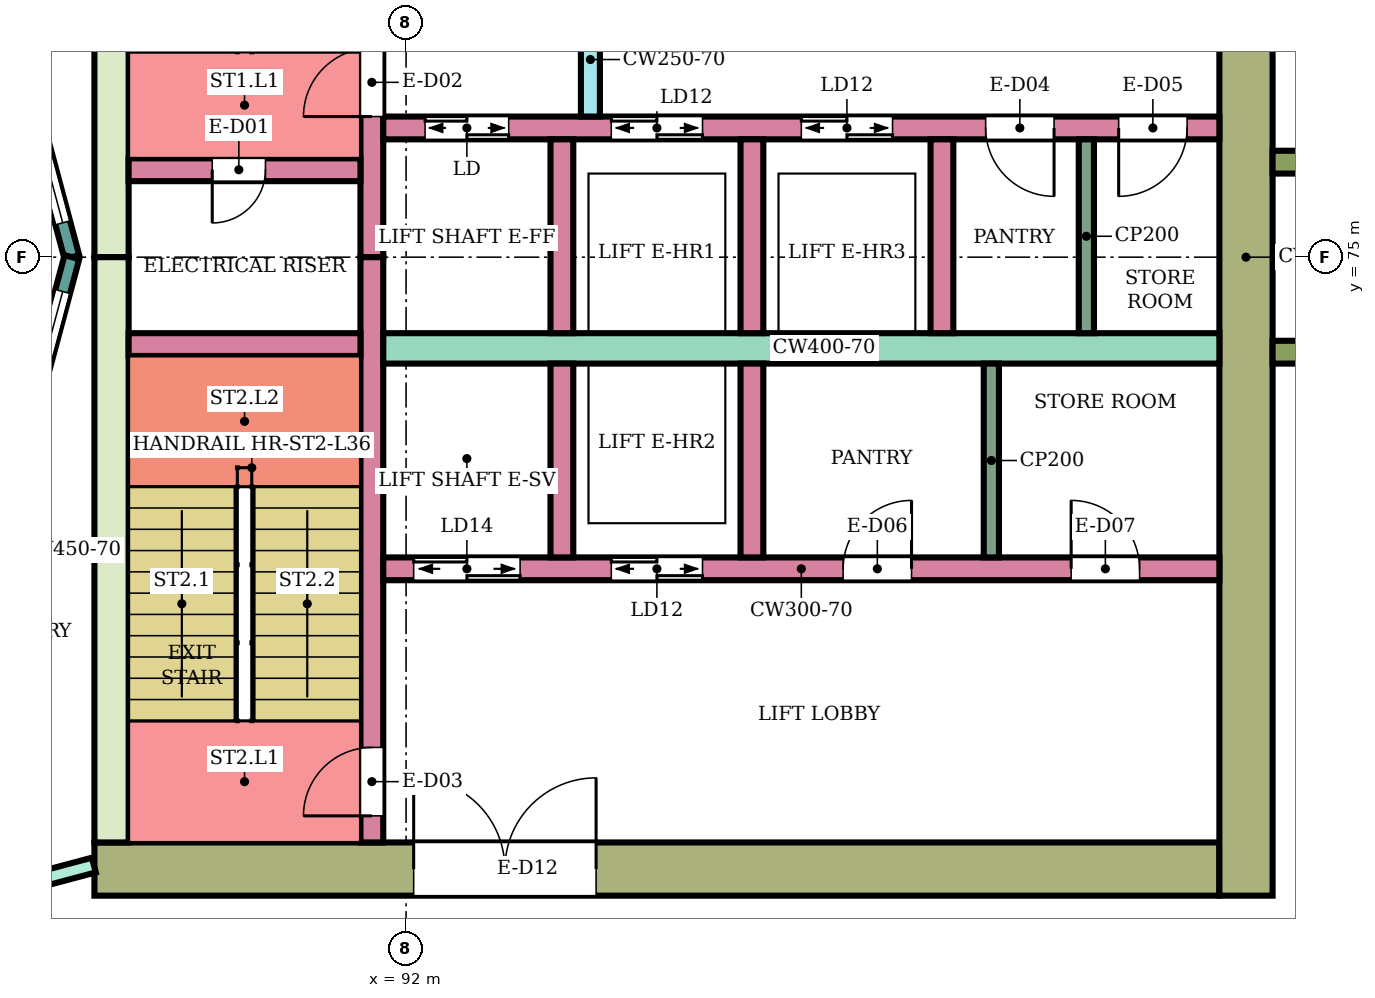
"""IFC4 building model, lengths in metres.
Left out: names, types, materials, properties, quantities, classifications, styles, units other than length and angle.
Written with IfcOpenShell. Run it as: python <this file> out.ifc"""

import sys

from ifc_helpers import new_model, si_unit, direction, frame, frame_2d, origin, place, context, subcontext, project, spatial, rectangle, extrude, element, fill, save


model = new_model("IFC4")
c1 = context("Model", 3, precision=1e-05, world=origin(), true_north=direction((0.0, 1.0)))
c2 = subcontext(c1, "Body", "Model", "MODEL_VIEW")
j1 = project(units=[si_unit("LENGTHUNIT", "METRE"), si_unit("PLANEANGLEUNIT", "RADIAN")], contexts=[c1])
p1 = place(None, origin())
s1 = spatial("IfcSite", under=j1, at=p1, CompositionType="ELEMENT")
p2 = place(p1, origin())
s2 = spatial("IfcBuilding", under=s1, at=p2, CompositionType="ELEMENT")
p3 = place(p2, frame((0.0, 0.0, 157.7)))
s3 = spatial("IfcBuildingStorey", under=s2, at=p3, CompositionType="ELEMENT", Elevation=157.7)
p4 = place(p3, frame((87.9, 66.95, 0.0), z_axis=(0.0, 0.0, 1.0), x_axis=(1.0, 0.0, 0.0)))
e1 = element("IfcWall", 1, at=p4, inside=s3, PredefinedType="SHEAR", context=c2, shape_type="SweptSolid", body=[
    extrude(rectangle(XDim=14.8, YDim=0.7, at=frame_2d((7.4, 0.0))), origin(), (0.0, 0.0, 1.0), 3.78),
])
p5 = place(p4, frame((4.2, 0.0, 0.0)))
e2 = element("IfcOpeningElement", 2, at=p5, cuts=e1, PredefinedType="OPENING", context=c2, shape_type="SweptSolid", body=[
    extrude(rectangle(XDim=2.4, YDim=2.4, at=frame_2d((1.2, 1.2))), frame((0.0, 0.36, 0.0), z_axis=(0.0, -1.0, 0.0), x_axis=(1.0, 0.0, 0.0)), (0.0, 0.0, 1.0), 0.72),
])
for number, where, z_axis, x_axis in (
    (3, (88.125, 75.0, 0.0), (0.0, 0.0, 1.0), (0.0, 1.0, 0.0)),
    (4, (88.125, 67.3, 0.0), (0.0, 0.0, 1.0), (0.0, 1.0, 0.0)),
):
    element("IfcWall", number, at=place(p3, frame(where, z_axis=z_axis, x_axis=x_axis)), inside=s3, PredefinedType="SHEAR", context=c2, shape_type="SweptSolid", body=[
        extrude(rectangle(XDim=7.7, YDim=0.45, at=frame_2d((3.85, 0.0))), origin(), (0.0, 0.0, 1.0), 3.78),
    ])
p6 = place(p3, frame((103.05, 66.6, 0.0), z_axis=(0.0, 0.0, 1.0), x_axis=(0.0, 1.0, 0.0)))
e5 = element("IfcWall", 5, at=p6, inside=s3, PredefinedType="SHEAR", context=c2, shape_type="SweptSolid", body=[
    extrude(rectangle(XDim=16.8, YDim=0.7, at=frame_2d((8.4, 0.0))), origin(), (0.0, 0.0, 1.0), 3.78),
])
p7 = place(p3, frame((91.55, 75.0, 0.0), z_axis=(0.0, 0.0, 1.0), x_axis=(0.0, 1.0, 0.0)))
e6 = element("IfcWall", 6, at=p7, inside=s3, PredefinedType="SHEAR", context=c2, shape_type="SweptSolid", body=[
    extrude(rectangle(XDim=7.7, YDim=0.3, at=frame_2d((3.85, 0.0))), origin(), (0.0, 0.0, 1.0), 3.78),
])
p8 = place(p7, frame((1.85, 0.0, 0.0)))
e7 = element("IfcOpeningElement", 7, at=p8, cuts=e6, PredefinedType="OPENING", context=c2, shape_type="SweptSolid", body=[
    extrude(rectangle(XDim=0.9, YDim=2.1, at=frame_2d((0.45, 1.05))), frame((0.0, 0.16, 0.0), z_axis=(0.0, -1.0, 0.0), x_axis=(1.0, 0.0, 0.0)), (0.0, 0.0, 1.0), 0.32),
])
p9 = place(p3, frame((91.55, 67.3, 0.0), z_axis=(0.0, 0.0, 1.0), x_axis=(0.0, 1.0, 0.0)))
e8 = element("IfcWall", 8, at=p9, inside=s3, PredefinedType="SHEAR", context=c2, shape_type="SweptSolid", body=[
    extrude(rectangle(XDim=7.7, YDim=0.3, at=frame_2d((3.85, 0.0))), origin(), (0.0, 0.0, 1.0), 3.78),
])
p10 = place(p9, frame((0.35, 0.0, 0.0)))
e9 = element("IfcOpeningElement", 9, at=p10, cuts=e8, PredefinedType="OPENING", context=c2, shape_type="SweptSolid", body=[
    extrude(rectangle(XDim=0.9, YDim=2.1, at=frame_2d((0.45, 1.05))), frame((0.0, 0.16, 0.0), z_axis=(0.0, -1.0, 0.0), x_axis=(1.0, 0.0, 0.0)), (0.0, 0.0, 1.0), 0.32),
])
p11 = place(p3, frame((88.35, 76.15, 0.0), z_axis=(0.0, 0.0, 1.0), x_axis=(1.0, 0.0, 0.0)))
e10 = element("IfcWall", 10, at=p11, inside=s3, PredefinedType="SHEAR", context=c2, shape_type="SweptSolid", body=[
    extrude(rectangle(XDim=3.05, YDim=0.3, at=frame_2d((1.525, 0.0))), origin(), (0.0, 0.0, 1.0), 3.78),
])
p12 = place(p11, frame((1.1, 0.0, 0.0)))
e11 = element("IfcOpeningElement", 11, at=p12, cuts=e10, PredefinedType="OPENING", context=c2, shape_type="SweptSolid", body=[
    extrude(rectangle(XDim=0.7, YDim=2.0, at=frame_2d((0.35, 1.0))), frame((0.0, 0.16, 0.0), z_axis=(0.0, -1.0, 0.0), x_axis=(1.0, 0.0, 0.0)), (0.0, 0.0, 1.0), 0.32),
])
p13 = place(p3, frame((88.35, 73.85, 0.0), z_axis=(0.0, 0.0, 1.0), x_axis=(1.0, 0.0, 0.0)))
e12 = element("IfcWall", 12, at=p13, inside=s3, PredefinedType="SHEAR", context=c2, shape_type="SweptSolid", body=[
    extrude(rectangle(XDim=3.05, YDim=0.3, at=frame_2d((1.525, 0.0))), origin(), (0.0, 0.0, 1.0), 3.78),
])
p14 = place(p3, frame((91.7, 76.7, 0.0), z_axis=(0.0, 0.0, 1.0), x_axis=(1.0, 0.0, 0.0)))
e13 = element("IfcWall", 13, at=p14, inside=s3, PredefinedType="SHEAR", context=c2, shape_type="SweptSolid", body=[
    extrude(rectangle(XDim=11.0, YDim=0.3, at=frame_2d((5.5, 0.0))), origin(), (0.0, 0.0, 1.0), 3.78),
])
p15 = place(p14, frame((0.55, 0.0, 0.0)))
e14 = element("IfcOpeningElement", 14, at=p15, cuts=e13, PredefinedType="OPENING", context=c2, shape_type="SweptSolid", body=[
    extrude(rectangle(XDim=1.1, YDim=2.1, at=frame_2d((0.55, 1.05))), frame((0.0, 0.16, 0.0), z_axis=(0.0, -1.0, 0.0), x_axis=(1.0, 0.0, 0.0)), (0.0, 0.0, 1.0), 0.32),
])
p16 = place(p14, frame((3.0, 0.0, 0.0)))
e15 = element("IfcOpeningElement", 15, at=p16, cuts=e13, PredefinedType="OPENING", context=c2, shape_type="SweptSolid", body=[
    extrude(rectangle(XDim=1.2, YDim=2.1, at=frame_2d((0.6, 1.05))), frame((0.0, 0.16, 0.0), z_axis=(0.0, -1.0, 0.0), x_axis=(1.0, 0.0, 0.0)), (0.0, 0.0, 1.0), 0.32),
])
p17 = place(p14, frame((5.5, 0.0, 0.0)))
e16 = element("IfcOpeningElement", 16, at=p17, cuts=e13, PredefinedType="OPENING", context=c2, shape_type="SweptSolid", body=[
    extrude(rectangle(XDim=1.2, YDim=2.1, at=frame_2d((0.6, 1.05))), frame((0.0, 0.16, 0.0), z_axis=(0.0, -1.0, 0.0), x_axis=(1.0, 0.0, 0.0)), (0.0, 0.0, 1.0), 0.32),
])
p18 = place(p14, frame((7.925, 0.0, 0.0)))
e17 = element("IfcOpeningElement", 17, at=p18, cuts=e13, PredefinedType="OPENING", context=c2, shape_type="SweptSolid", body=[
    extrude(rectangle(XDim=0.9, YDim=2.1, at=frame_2d((0.45, 1.05))), frame((0.0, 0.16, 0.0), z_axis=(0.0, -1.0, 0.0), x_axis=(1.0, 0.0, 0.0)), (0.0, 0.0, 1.0), 0.32),
])
p19 = place(p14, frame((9.675, 0.0, 0.0)))
e18 = element("IfcOpeningElement", 18, at=p19, cuts=e13, PredefinedType="OPENING", context=c2, shape_type="SweptSolid", body=[
    extrude(rectangle(XDim=0.9, YDim=2.1, at=frame_2d((0.45, 1.05))), frame((0.0, 0.16, 0.0), z_axis=(0.0, -1.0, 0.0), x_axis=(1.0, 0.0, 0.0)), (0.0, 0.0, 1.0), 0.32),
])
p20 = place(p3, frame((91.7, 73.8, 0.0), z_axis=(0.0, 0.0, 1.0), x_axis=(1.0, 0.0, 0.0)))
e19 = element("IfcWall", 19, at=p20, inside=s3, PredefinedType="SHEAR", context=c2, shape_type="SweptSolid", body=[
    extrude(rectangle(XDim=11.0, YDim=0.4, at=frame_2d((5.5, 0.0))), origin(), (0.0, 0.0, 1.0), 3.78),
])
p21 = place(p3, frame((91.7, 70.9, 0.0), z_axis=(0.0, 0.0, 1.0), x_axis=(1.0, 0.0, 0.0)))
e20 = element("IfcWall", 20, at=p21, inside=s3, PredefinedType="SHEAR", context=c2, shape_type="SweptSolid", body=[
    extrude(rectangle(XDim=11.0, YDim=0.3, at=frame_2d((5.5, 0.0))), origin(), (0.0, 0.0, 1.0), 3.78),
])
p22 = place(p21, frame((0.4, 0.0, 0.0)))
e21 = element("IfcOpeningElement", 21, at=p22, cuts=e20, PredefinedType="OPENING", context=c2, shape_type="SweptSolid", body=[
    extrude(rectangle(XDim=1.4, YDim=2.1, at=frame_2d((0.7, 1.05))), frame((0.0, 0.16, 0.0), z_axis=(0.0, -1.0, 0.0), x_axis=(1.0, 0.0, 0.0)), (0.0, 0.0, 1.0), 0.32),
])
p23 = place(p21, frame((3.0, 0.0, 0.0)))
e22 = element("IfcOpeningElement", 22, at=p23, cuts=e20, PredefinedType="OPENING", context=c2, shape_type="SweptSolid", body=[
    extrude(rectangle(XDim=1.2, YDim=2.1, at=frame_2d((0.6, 1.05))), frame((0.0, 0.16, 0.0), z_axis=(0.0, -1.0, 0.0), x_axis=(1.0, 0.0, 0.0)), (0.0, 0.0, 1.0), 0.32),
])
p24 = place(p21, frame((6.05, 0.0, 0.0)))
e23 = element("IfcOpeningElement", 23, at=p24, cuts=e20, PredefinedType="OPENING", context=c2, shape_type="SweptSolid", body=[
    extrude(rectangle(XDim=0.9, YDim=2.1, at=frame_2d((0.45, 1.05))), frame((0.0, 0.16, 0.0), z_axis=(0.0, -1.0, 0.0), x_axis=(1.0, 0.0, 0.0)), (0.0, 0.0, 1.0), 0.32),
])
p25 = place(p21, frame((9.05, 0.0, 0.0)))
e24 = element("IfcOpeningElement", 24, at=p25, cuts=e20, PredefinedType="OPENING", context=c2, shape_type="SweptSolid", body=[
    extrude(rectangle(XDim=0.9, YDim=2.1, at=frame_2d((0.45, 1.05))), frame((0.0, 0.16, 0.0), z_axis=(0.0, -1.0, 0.0), x_axis=(1.0, 0.0, 0.0)), (0.0, 0.0, 1.0), 0.32),
])
for number, where, z_axis, x_axis in (
    (25, (94.05, 74.0, 0.0), (0.0, 0.0, 1.0), (0.0, 1.0, 0.0)),
    (26, (96.55, 74.0, 0.0), (0.0, 0.0, 1.0), (0.0, 1.0, 0.0)),
    (27, (99.05, 74.0, 0.0), (0.0, 0.0, 1.0), (0.0, 1.0, 0.0)),
    (28, (94.05, 71.05, 0.0), (0.0, 0.0, 1.0), (0.0, 1.0, 0.0)),
    (29, (96.55, 71.05, 0.0), (0.0, 0.0, 1.0), (0.0, 1.0, 0.0)),
):
    element("IfcWall", number, at=place(p3, frame(where, z_axis=z_axis, x_axis=x_axis)), inside=s3, PredefinedType="SHEAR", context=c2, shape_type="SweptSolid", body=[
        extrude(rectangle(XDim=2.55, YDim=0.3, at=frame_2d((1.275, 0.0))), origin(), (0.0, 0.0, 1.0), 3.78),
    ])
p26 = place(p3, frame((94.425, 76.85, 0.0), z_axis=(0.0, 0.0, 1.0), x_axis=(0.0, 1.0, 0.0)))
e30 = element("IfcWall", 30, at=p26, inside=s3, PredefinedType="SHEAR", context=c2, shape_type="SweptSolid", body=[
    extrude(rectangle(XDim=1.5, YDim=0.25, at=frame_2d((0.75, 0.0))), origin(), (0.0, 0.0, 1.0), 3.78),
])
for number, where, z_axis, x_axis in (
    (31, (103.4, 73.75, 0.0), (0.0, 0.0, 1.0), (1.0, 0.0, 0.0)),
    (32, (103.4, 76.25, 0.0), (0.0, 0.0, 1.0), (1.0, 0.0, 0.0)),
):
    element("IfcWall", number, at=place(p3, frame(where, z_axis=z_axis, x_axis=x_axis)), inside=s3, PredefinedType="NOTDEFINED", context=c2, shape_type="SweptSolid", body=[
        extrude(rectangle(XDim=2.416, YDim=0.3, at=frame_2d((1.208, 0.0))), origin(), (0.0, 0.0, 1.0), 4.1),
    ])
p27 = place(p3, frame((87.604, 75.0, 0.0), z_axis=(0.0, 0.0, 1.0), x_axis=(-0.258789828301, 0.965933654434, 0.0)))
e33 = element("IfcWall", 33, at=p27, inside=s3, PredefinedType="NOTDEFINED", context=c2, shape_type="SweptSolid", body=[
    extrude(rectangle(XDim=3.936, YDim=0.2, at=frame_2d((1.968, 0.0))), origin(), (0.0, 0.0, 1.0), 4.1),
])
p28 = place(p27, frame((0.468, 0.0, 0.9)))
e34 = element("IfcOpeningElement", 34, at=p28, cuts=e33, PredefinedType="OPENING", context=c2, shape_type="SweptSolid", body=[
    extrude(rectangle(XDim=3.0, YDim=2.3, at=frame_2d((1.5, 1.15))), frame((0.0, 0.11, 0.0), z_axis=(0.0, -1.0, 0.0), x_axis=(1.0, 0.0, 0.0)), (0.0, 0.0, 1.0), 0.22),
])
p29 = place(p3, frame((86.585, 71.198, 0.0), z_axis=(0.0, 0.0, 1.0), x_axis=(0.258789828301, 0.965933654434, 0.0)))
e35 = element("IfcWall", 35, at=p29, inside=s3, PredefinedType="NOTDEFINED", context=c2, shape_type="SweptSolid", body=[
    extrude(rectangle(XDim=3.936, YDim=0.2, at=frame_2d((1.968, 0.0))), origin(), (0.0, 0.0, 1.0), 4.1),
])
p30 = place(p29, frame((0.468, 0.0, 0.9)))
e36 = element("IfcOpeningElement", 36, at=p30, cuts=e35, PredefinedType="OPENING", context=c2, shape_type="SweptSolid", body=[
    extrude(rectangle(XDim=3.0, YDim=2.3, at=frame_2d((1.5, 1.15))), frame((0.0, 0.11, 0.0), z_axis=(0.0, -1.0, 0.0), x_axis=(1.0, 0.0, 0.0)), (0.0, 0.0, 1.0), 0.22),
])
p31 = place(p3, frame((80.125, 64.932, 0.0), z_axis=(0.0, 0.0, 1.0), x_axis=(0.966236955806, 0.257655089674, 0.0)))
e37 = element("IfcWall", 37, at=p31, inside=s3, PredefinedType="PARTITIONING", context=c2, shape_type="SweptSolid", body=[
    extrude(rectangle(XDim=8.039, YDim=0.2, at=frame_2d((4.02, 0.0))), origin(), (0.0, 0.0, 1.0), 3.65),
])
p32 = place(p31, frame((6.298, 0.0, 0.0)))
e38 = element("IfcOpeningElement", 38, at=p32, cuts=e37, PredefinedType="OPENING", context=c2, shape_type="SweptSolid", body=[
    extrude(rectangle(XDim=0.9, YDim=2.1, at=frame_2d((0.45, 1.05))), frame((0.0, 0.11, 0.0), z_axis=(0.0, -1.0, 0.0), x_axis=(1.0, 0.0, 0.0)), (0.0, 0.0, 1.0), 0.22),
])
p33 = place(p31, frame((2.045, 0.0, 0.0)))
e39 = element("IfcOpeningElement", 39, at=p33, cuts=e37, PredefinedType="OPENING", context=c2, shape_type="SweptSolid", body=[
    extrude(rectangle(XDim=0.9, YDim=2.1, at=frame_2d((0.45, 1.05))), frame((0.0, 0.11, 0.0), z_axis=(0.0, -1.0, 0.0), x_axis=(1.0, 0.0, 0.0)), (0.0, 0.0, 1.0), 0.22),
])
for number, where, z_axis, x_axis in (
    (40, (100.95, 74.0, 0.0), (0.0, 0.0, 1.0), (0.0, 1.0, 0.0)),
    (41, (99.7, 71.05, 0.0), (0.0, 0.0, 1.0), (0.0, 1.0, 0.0)),
):
    element("IfcWall", number, at=place(p3, frame(where, z_axis=z_axis, x_axis=x_axis)), inside=s3, PredefinedType="PARTITIONING", context=c2, shape_type="SweptSolid", body=[
        extrude(rectangle(XDim=2.55, YDim=0.2, at=frame_2d((1.275, 0.0))), origin(), (0.0, 0.0, 1.0), 3.78),
    ])
p34 = place(p28, origin())
e42 = element("IfcWindow", 42, at=p34, inside=s3, PartitioningType="SINGLE_PANEL", PredefinedType="WINDOW", context=c2, shape_type="SweptSolid", body=[
    extrude(rectangle(XDim=3.0, YDim=2.3, at=frame_2d((1.5, 1.15))), frame((0.0, 0.03, 0.0), z_axis=(0.0, -1.0, 0.0), x_axis=(1.0, 0.0, 0.0)), (0.0, 0.0, 1.0), 0.06),
])
fill(e34, e42)
p35 = place(p30, origin())
e43 = element("IfcWindow", 43, at=p35, inside=s3, PartitioningType="SINGLE_PANEL", PredefinedType="WINDOW", context=c2, shape_type="SweptSolid", body=[
    extrude(rectangle(XDim=3.0, YDim=2.3, at=frame_2d((1.5, 1.15))), frame((0.0, 0.03, 0.0), z_axis=(0.0, -1.0, 0.0), x_axis=(1.0, 0.0, 0.0)), (0.0, 0.0, 1.0), 0.06),
])
fill(e36, e43)
p36 = place(p12, frame((0.7, 0.0, 0.0), z_axis=(0.0, 0.0, 1.0), x_axis=(-1.0, 0.0, 0.0)))
e44 = element("IfcDoor", 44, at=p36, inside=s3, OperationType="SINGLE_SWING_RIGHT", PredefinedType="DOOR", context=c2, shape_type="SweptSolid", body=[
    extrude(rectangle(XDim=0.7, YDim=2.0, at=frame_2d((0.35, 1.0))), frame((0.0, 0.025, 0.0), z_axis=(0.0, -1.0, 0.0), x_axis=(1.0, 0.0, 0.0)), (0.0, 0.0, 1.0), 0.05),
])
fill(e11, e44)
p37 = place(p8, origin())
e45 = element("IfcDoor", 45, at=p37, inside=s3, OperationType="SINGLE_SWING_LEFT", PredefinedType="DOOR", context=c2, shape_type="SweptSolid", body=[
    extrude(rectangle(XDim=0.9, YDim=2.1, at=frame_2d((0.45, 1.05))), frame((0.0, 0.025, 0.0), z_axis=(0.0, -1.0, 0.0), x_axis=(1.0, 0.0, 0.0)), (0.0, 0.0, 1.0), 0.05),
])
fill(e7, e45)
p38 = place(p10, origin())
e46 = element("IfcDoor", 46, at=p38, inside=s3, OperationType="SINGLE_SWING_LEFT", PredefinedType="DOOR", context=c2, shape_type="SweptSolid", body=[
    extrude(rectangle(XDim=0.9, YDim=2.1, at=frame_2d((0.45, 1.05))), frame((0.0, 0.025, 0.0), z_axis=(0.0, -1.0, 0.0), x_axis=(1.0, 0.0, 0.0)), (0.0, 0.0, 1.0), 0.05),
])
fill(e9, e46)
p39 = place(p15, origin())
e47 = element("IfcDoor", 47, at=p39, inside=s3, OperationType="DOUBLE_DOOR_SLIDING", PredefinedType="DOOR", context=c2, shape_type="SweptSolid", body=[
    extrude(rectangle(XDim=1.1, YDim=2.1, at=frame_2d((0.55, 1.05))), frame((0.0, 0.025, 0.0), z_axis=(0.0, -1.0, 0.0), x_axis=(1.0, 0.0, 0.0)), (0.0, 0.0, 1.0), 0.05),
])
fill(e14, e47)
p40 = place(p16, origin())
e48 = element("IfcDoor", 48, at=p40, inside=s3, OperationType="DOUBLE_DOOR_SLIDING", PredefinedType="DOOR", context=c2, shape_type="SweptSolid", body=[
    extrude(rectangle(XDim=1.2, YDim=2.1, at=frame_2d((0.6, 1.05))), frame((0.0, 0.025, 0.0), z_axis=(0.0, -1.0, 0.0), x_axis=(1.0, 0.0, 0.0)), (0.0, 0.0, 1.0), 0.05),
])
fill(e15, e48)
p41 = place(p17, origin())
e49 = element("IfcDoor", 49, at=p41, inside=s3, OperationType="DOUBLE_DOOR_SLIDING", PredefinedType="DOOR", context=c2, shape_type="SweptSolid", body=[
    extrude(rectangle(XDim=1.2, YDim=2.1, at=frame_2d((0.6, 1.05))), frame((0.0, 0.025, 0.0), z_axis=(0.0, -1.0, 0.0), x_axis=(1.0, 0.0, 0.0)), (0.0, 0.0, 1.0), 0.05),
])
fill(e16, e49)
p42 = place(p18, frame((0.9, 0.0, 0.0), z_axis=(0.0, 0.0, 1.0), x_axis=(-1.0, 0.0, 0.0)))
e50 = element("IfcDoor", 50, at=p42, inside=s3, OperationType="SINGLE_SWING_LEFT", PredefinedType="DOOR", context=c2, shape_type="SweptSolid", body=[
    extrude(rectangle(XDim=0.9, YDim=2.1, at=frame_2d((0.45, 1.05))), frame((0.0, 0.025, 0.0), z_axis=(0.0, -1.0, 0.0), x_axis=(1.0, 0.0, 0.0)), (0.0, 0.0, 1.0), 0.05),
])
fill(e17, e50)
p43 = place(p19, frame((0.9, 0.0, 0.0), z_axis=(0.0, 0.0, 1.0), x_axis=(-1.0, 0.0, 0.0)))
e51 = element("IfcDoor", 51, at=p43, inside=s3, OperationType="SINGLE_SWING_RIGHT", PredefinedType="DOOR", context=c2, shape_type="SweptSolid", body=[
    extrude(rectangle(XDim=0.9, YDim=2.1, at=frame_2d((0.45, 1.05))), frame((0.0, 0.025, 0.0), z_axis=(0.0, -1.0, 0.0), x_axis=(1.0, 0.0, 0.0)), (0.0, 0.0, 1.0), 0.05),
])
fill(e18, e51)
p44 = place(p22, origin())
e52 = element("IfcDoor", 52, at=p44, inside=s3, OperationType="DOUBLE_DOOR_SLIDING", PredefinedType="DOOR", context=c2, shape_type="SweptSolid", body=[
    extrude(rectangle(XDim=1.4, YDim=2.1, at=frame_2d((0.7, 1.05))), frame((0.0, 0.025, 0.0), z_axis=(0.0, -1.0, 0.0), x_axis=(1.0, 0.0, 0.0)), (0.0, 0.0, 1.0), 0.05),
])
fill(e21, e52)
p45 = place(p23, origin())
e53 = element("IfcDoor", 53, at=p45, inside=s3, OperationType="DOUBLE_DOOR_SLIDING", PredefinedType="DOOR", context=c2, shape_type="SweptSolid", body=[
    extrude(rectangle(XDim=1.2, YDim=2.1, at=frame_2d((0.6, 1.05))), frame((0.0, 0.025, 0.0), z_axis=(0.0, -1.0, 0.0), x_axis=(1.0, 0.0, 0.0)), (0.0, 0.0, 1.0), 0.05),
])
fill(e22, e53)
p46 = place(p24, origin())
e54 = element("IfcDoor", 54, at=p46, inside=s3, OperationType="SINGLE_SWING_RIGHT", PredefinedType="DOOR", context=c2, shape_type="SweptSolid", body=[
    extrude(rectangle(XDim=0.9, YDim=2.1, at=frame_2d((0.45, 1.05))), frame((0.0, 0.025, 0.0), z_axis=(0.0, -1.0, 0.0), x_axis=(1.0, 0.0, 0.0)), (0.0, 0.0, 1.0), 0.05),
])
fill(e23, e54)
p47 = place(p25, origin())
e55 = element("IfcDoor", 55, at=p47, inside=s3, OperationType="SINGLE_SWING_LEFT", PredefinedType="DOOR", context=c2, shape_type="SweptSolid", body=[
    extrude(rectangle(XDim=0.9, YDim=2.1, at=frame_2d((0.45, 1.05))), frame((0.0, 0.025, 0.0), z_axis=(0.0, -1.0, 0.0), x_axis=(1.0, 0.0, 0.0)), (0.0, 0.0, 1.0), 0.05),
])
fill(e24, e55)
p48 = place(p5, origin())
e56 = element("IfcDoor", 56, at=p48, inside=s3, OperationType="DOUBLE_DOOR_SINGLE_SWING", PredefinedType="DOOR", context=c2, shape_type="SweptSolid", body=[
    extrude(rectangle(XDim=2.4, YDim=2.4, at=frame_2d((1.2, 1.2))), frame((0.0, 0.025, 0.0), z_axis=(0.0, -1.0, 0.0), x_axis=(1.0, 0.0, 0.0)), (0.0, 0.0, 1.0), 0.05),
])
fill(e2, e56)
save(model, sys.argv[1])
